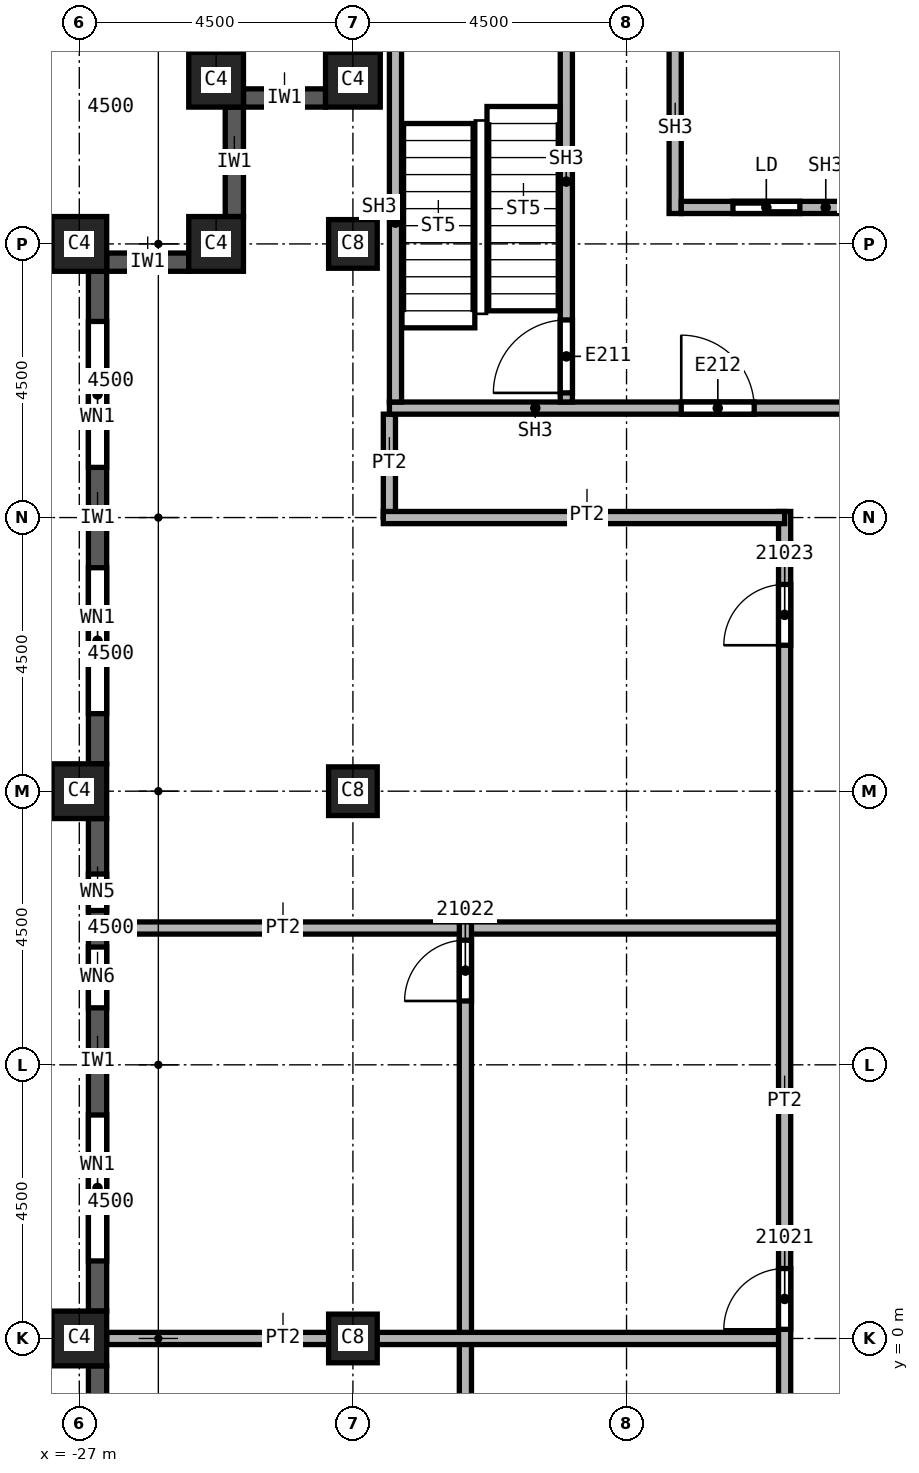
"""IFC4 building model, lengths in metres.
Left out: names, types, materials, properties, quantities, classifications, styles, units other than length and angle.
Written with IfcOpenShell. Run it as: python <this file> out.ifc"""

import sys

from ifc_helpers import new_model, si_unit, direction, frame, frame_2d, origin, origin_2d, place, context, subcontext, project, spatial, rectangle, extrude, element, fill, save


model = new_model("IFC4")
c1 = context("Model", 3, precision=1e-05, world=origin(), true_north=direction((0.0, 1.0)))
c2 = subcontext(c1, "Body", "Model", "MODEL_VIEW")
j1 = project(units=[si_unit("LENGTHUNIT", "METRE"), si_unit("PLANEANGLEUNIT", "RADIAN")], contexts=[c1])
p1 = place(None, origin())
s1 = spatial("IfcSite", under=j1, at=p1, CompositionType="ELEMENT")
p2 = place(p1, origin())
s2 = spatial("IfcBuilding", under=s1, at=p2, CompositionType="ELEMENT")
p3 = place(p2, frame((0.0, 0.0, 308.0)))
s3 = spatial("IfcBuildingStorey", under=s2, at=p3, CompositionType="ELEMENT", Elevation=308.0)
for number, where, z_axis, x_axis in (
    (1, (-22.5, 0.0, 0.0), (0.0, 0.0, 1.0), (1.0, 0.0, 0.0)),
    (2, (-22.5, 9.0, 0.0), (0.0, 0.0, 1.0), (1.0, 0.0, 0.0)),
    (3, (-22.5, 18.0, 0.0), (0.0, 0.0, 1.0), (1.0, 0.0, 0.0)),
):
    element("IfcColumn", number, at=place(p3, frame(where, z_axis=z_axis, x_axis=x_axis)), inside=s3, PredefinedType="COLUMN", context=c2, shape_type="SweptSolid", body=[
        extrude(rectangle(XDim=0.8, YDim=0.8, at=origin_2d()), origin(), (0.0, 0.0, 1.0), 3.74),
    ])
for number, where, z_axis, x_axis in (
    (4, (-27.0, 0.0, 0.0), (0.0, 0.0, 1.0), (0.0, 1.0, 0.0)),
    (5, (-27.0, 9.0, 0.0), (0.0, 0.0, 1.0), (0.0, 1.0, 0.0)),
    (6, (-27.0, 18.0, 0.0), (0.0, 0.0, 1.0), (0.0, 1.0, 0.0)),
    (7, (-22.5, 20.7, 0.0), (0.0, 0.0, 1.0), (1.0, 0.0, 0.0)),
    (8, (-24.75, 20.7, 0.0), (0.0, 0.0, 1.0), (1.0, 0.0, 0.0)),
    (9, (-24.75, 18.0, 0.0), (0.0, 0.0, 1.0), (1.0, 0.0, 0.0)),
):
    element("IfcColumn", number, at=place(p3, frame(where, z_axis=z_axis, x_axis=x_axis)), inside=s3, PredefinedType="COLUMN", context=c2, shape_type="SweptSolid", body=[
        extrude(rectangle(XDim=0.9, YDim=0.9, at=origin_2d()), origin(), (0.0, 0.0, 1.0), 3.74),
    ])
p4 = place(p3, frame((-24.45, 20.25, 0.0), z_axis=(0.0, 0.0, 1.0), x_axis=(0.0, -1.0, 0.0)))
e10 = element("IfcWall", 10, at=p4, inside=s3, PredefinedType="SOLIDWALL", context=c2, shape_type="SweptSolid", body=[
    extrude(rectangle(XDim=1.8, YDim=0.3, at=frame_2d((0.9, 0.0))), origin(), (0.0, 0.0, 1.0), 3.14),
])
p5 = place(p3, frame((-25.2, 17.7, 0.0), z_axis=(0.0, 0.0, 1.0), x_axis=(-1.0, 0.0, 0.0)))
e11 = element("IfcWall", 11, at=p5, inside=s3, PredefinedType="SOLIDWALL", context=c2, shape_type="SweptSolid", body=[
    extrude(rectangle(XDim=1.35, YDim=0.3, at=frame_2d((0.675, 0.0))), origin(), (0.0, 0.0, 1.0), 3.14),
])
p6 = place(p3, frame((-26.7, 17.55, 0.0), z_axis=(0.0, 0.0, 1.0), x_axis=(0.0, -1.0, 0.0)))
e12 = element("IfcWall", 12, at=p6, inside=s3, PredefinedType="SOLIDWALL", context=c2, shape_type="SweptSolid", body=[
    extrude(rectangle(XDim=8.1, YDim=0.3, at=frame_2d((4.05, 0.0))), origin(), (0.0, 0.0, 1.0), 3.14),
])
p7 = place(p6, frame((0.825, 0.0, 0.8)))
e13 = element("IfcOpeningElement", 13, at=p7, cuts=e12, PredefinedType="OPENING", context=c2, shape_type="SweptSolid", body=[
    extrude(rectangle(XDim=2.4, YDim=1.95, at=frame_2d((1.2, 0.975))), frame((0.0, 0.15, 0.0), z_axis=(0.0, -1.0, 0.0), x_axis=(1.0, 0.0, 0.0)), (0.0, 0.0, 1.0), 0.3),
])
p8 = place(p6, frame((4.875, 0.0, 0.8)))
e14 = element("IfcOpeningElement", 14, at=p8, cuts=e12, PredefinedType="OPENING", context=c2, shape_type="SweptSolid", body=[
    extrude(rectangle(XDim=2.4, YDim=1.95, at=frame_2d((1.2, 0.975))), frame((0.0, 0.15, 0.0), z_axis=(0.0, -1.0, 0.0), x_axis=(1.0, 0.0, 0.0)), (0.0, 0.0, 1.0), 0.3),
])
p9 = place(p3, frame((-26.7, 8.55, 0.0), z_axis=(0.0, 0.0, 1.0), x_axis=(0.0, -1.0, 0.0)))
e15 = element("IfcWall", 15, at=p9, inside=s3, PredefinedType="SOLIDWALL", context=c2, shape_type="SweptSolid", body=[
    extrude(rectangle(XDim=8.1, YDim=0.3, at=frame_2d((4.05, 0.0))), origin(), (0.0, 0.0, 1.0), 3.14),
])
p10 = place(p9, frame((4.875, 0.0, 0.8)))
e16 = element("IfcOpeningElement", 16, at=p10, cuts=e15, PredefinedType="OPENING", context=c2, shape_type="SweptSolid", body=[
    extrude(rectangle(XDim=2.4, YDim=1.95, at=frame_2d((1.2, 0.975))), frame((0.0, 0.15, 0.0), z_axis=(0.0, -1.0, 0.0), x_axis=(1.0, 0.0, 0.0)), (0.0, 0.0, 1.0), 0.3),
])
p11 = place(p9, frame((0.913, 0.0, 0.8)))
e17 = element("IfcOpeningElement", 17, at=p11, cuts=e15, PredefinedType="OPENING", context=c2, shape_type="SweptSolid", body=[
    extrude(rectangle(XDim=0.6, YDim=1.95, at=frame_2d((0.3, 0.975))), frame((0.0, 0.15, 0.0), z_axis=(0.0, -1.0, 0.0), x_axis=(1.0, 0.0, 0.0)), (0.0, 0.0, 1.0), 0.3),
])
p12 = place(p9, frame((2.113, 0.0, 0.8)))
e18 = element("IfcOpeningElement", 18, at=p12, cuts=e15, PredefinedType="OPENING", context=c2, shape_type="SweptSolid", body=[
    extrude(rectangle(XDim=1.0, YDim=1.95, at=frame_2d((0.5, 0.975))), frame((0.0, 0.15, 0.0), z_axis=(0.0, -1.0, 0.0), x_axis=(1.0, 0.0, 0.0)), (0.0, 0.0, 1.0), 0.3),
])
p13 = place(p3, frame((-26.7, -0.45, 0.0), z_axis=(0.0, 0.0, 1.0), x_axis=(0.0, -1.0, 0.0)))
e19 = element("IfcWall", 19, at=p13, inside=s3, PredefinedType="SOLIDWALL", context=c2, shape_type="SweptSolid", body=[
    extrude(rectangle(XDim=8.1, YDim=0.3, at=frame_2d((4.05, 0.0))), origin(), (0.0, 0.0, 1.0), 3.14),
])
p14 = place(p13, frame((0.825, 0.0, 0.8)))
e20 = element("IfcOpeningElement", 20, at=p14, cuts=e19, PredefinedType="OPENING", context=c2, shape_type="SweptSolid", body=[
    extrude(rectangle(XDim=2.4, YDim=1.95, at=frame_2d((1.2, 0.975))), frame((0.0, 0.15, 0.0), z_axis=(0.0, -1.0, 0.0), x_axis=(1.0, 0.0, 0.0)), (0.0, 0.0, 1.0), 0.3),
])
p15 = place(p13, frame((4.875, 0.0, 0.8)))
e21 = element("IfcOpeningElement", 21, at=p15, cuts=e19, PredefinedType="OPENING", context=c2, shape_type="SweptSolid", body=[
    extrude(rectangle(XDim=2.4, YDim=1.95, at=frame_2d((1.2, 0.975))), frame((0.0, 0.15, 0.0), z_axis=(0.0, -1.0, 0.0), x_axis=(1.0, 0.0, 0.0)), (0.0, 0.0, 1.0), 0.3),
])
p16 = place(p3, frame((-22.95, 20.4, 0.0), z_axis=(0.0, 0.0, 1.0), x_axis=(-1.0, 0.0, 0.0)))
e22 = element("IfcWall", 22, at=p16, inside=s3, PredefinedType="SOLIDWALL", context=c2, shape_type="SweptSolid", body=[
    extrude(rectangle(XDim=1.35, YDim=0.3, at=frame_2d((0.675, 0.0))), origin(), (0.0, 0.0, 1.0), 3.14),
])
p17 = place(p3, frame((-26.55, 6.75, 0.0), z_axis=(0.0, 0.0, 1.0), x_axis=(1.0, 0.0, 0.0)))
e23 = element("IfcWall", 23, at=p17, inside=s3, PredefinedType="PARTITIONING", context=c2, shape_type="SweptSolid", body=[
    extrude(rectangle(XDim=11.15, YDim=0.2, at=frame_2d((5.575, 0.0))), origin(), (0.0, 0.0, 1.0), 3.74),
])
p18 = place(p3, frame((-21.9, 13.5, 0.0), z_axis=(0.0, 0.0, 1.0), x_axis=(0.0, 1.0, 0.0)))
e24 = element("IfcWall", 24, at=p18, inside=s3, PredefinedType="PARTITIONING", context=c2, shape_type="SweptSolid", body=[
    extrude(rectangle(XDim=1.7, YDim=0.2, at=frame_2d((0.85, 0.0))), origin(), (0.0, 0.0, 1.0), 3.74),
])
p19 = place(p3, frame((-20.65, -11.25, 0.0), z_axis=(0.0, 0.0, 1.0), x_axis=(0.0, 1.0, 0.0)))
e25 = element("IfcWall", 25, at=p19, inside=s3, PredefinedType="PARTITIONING", context=c2, shape_type="SweptSolid", body=[
    extrude(rectangle(XDim=18.1, YDim=0.2, at=frame_2d((9.05, 0.0))), origin(), (0.0, 0.0, 1.0), 3.74),
])
p20 = place(p19, frame((16.8, 0.0, 0.0)))
e26 = element("IfcOpeningElement", 26, at=p20, cuts=e25, PredefinedType="OPENING", context=c2, shape_type="SweptSolid", body=[
    extrude(rectangle(XDim=1.0, YDim=2.1, at=frame_2d((0.5, 1.05))), frame((0.0, 0.1, 0.0), z_axis=(0.0, -1.0, 0.0), x_axis=(1.0, 0.0, 0.0)), (0.0, 0.0, 1.0), 0.2),
])
p21 = place(p19, frame((3.1, 0.0, 0.0)))
e27 = element("IfcOpeningElement", 27, at=p21, cuts=e25, PredefinedType="OPENING", context=c2, shape_type="SweptSolid", body=[
    extrude(rectangle(XDim=1.0, YDim=2.1, at=frame_2d((0.5, 1.05))), frame((0.0, 0.1, 0.0), z_axis=(0.0, -1.0, 0.0), x_axis=(1.0, 0.0, 0.0)), (0.0, 0.0, 1.0), 0.2),
])
p22 = place(p3, frame((-15.4, 0.0, 0.0), z_axis=(0.0, 0.0, 1.0), x_axis=(-1.0, 0.0, 0.0)))
e28 = element("IfcWall", 28, at=p22, inside=s3, PredefinedType="PARTITIONING", context=c2, shape_type="SweptSolid", body=[
    extrude(rectangle(XDim=11.15, YDim=0.2, at=frame_2d((5.575, 0.0))), origin(), (0.0, 0.0, 1.0), 3.74),
])
p23 = place(p3, frame((-15.4, -22.95, 0.0), z_axis=(0.0, 0.0, 1.0), x_axis=(0.0, 1.0, 0.0)))
e29 = element("IfcWall", 29, at=p23, inside=s3, PredefinedType="PARTITIONING", context=c2, shape_type="SweptSolid", body=[
    extrude(rectangle(XDim=36.55, YDim=0.2, at=frame_2d((18.275, 0.0))), origin(), (0.0, 0.0, 1.0), 3.74),
])
p24 = place(p23, frame((23.1, 0.0, 0.0)))
e30 = element("IfcOpeningElement", 30, at=p24, cuts=e29, PredefinedType="OPENING", context=c2, shape_type="SweptSolid", body=[
    extrude(rectangle(XDim=1.0, YDim=2.1, at=frame_2d((0.5, 1.05))), frame((0.0, 0.1, 0.0), z_axis=(0.0, -1.0, 0.0), x_axis=(1.0, 0.0, 0.0)), (0.0, 0.0, 1.0), 0.2),
])
p25 = place(p23, frame((34.35, 0.0, 0.0)))
e31 = element("IfcOpeningElement", 31, at=p25, cuts=e29, PredefinedType="OPENING", context=c2, shape_type="SweptSolid", body=[
    extrude(rectangle(XDim=1.0, YDim=2.1, at=frame_2d((0.5, 1.05))), frame((0.0, 0.1, 0.0), z_axis=(0.0, -1.0, 0.0), x_axis=(1.0, 0.0, 0.0)), (0.0, 0.0, 1.0), 0.2),
])
p26 = place(p23, frame((2.95, 0.0, 0.0)))
e32 = element("IfcOpeningElement", 32, at=p26, cuts=e29, PredefinedType="OPENING", context=c2, shape_type="SweptSolid", body=[
    extrude(rectangle(XDim=1.0, YDim=2.1, at=frame_2d((0.5, 1.05))), frame((0.0, 0.1, 0.0), z_axis=(0.0, -1.0, 0.0), x_axis=(1.0, 0.0, 0.0)), (0.0, 0.0, 1.0), 0.2),
])
p27 = place(p23, frame((6.15, 0.0, 0.0)))
e33 = element("IfcOpeningElement", 33, at=p27, cuts=e29, PredefinedType="OPENING", context=c2, shape_type="SweptSolid", body=[
    extrude(rectangle(XDim=1.0, YDim=2.1, at=frame_2d((0.5, 1.05))), frame((0.0, 0.1, 0.0), z_axis=(0.0, -1.0, 0.0), x_axis=(1.0, 0.0, 0.0)), (0.0, 0.0, 1.0), 0.2),
])
p28 = place(p23, frame((8.625, 0.0, 0.0)))
e34 = element("IfcOpeningElement", 34, at=p28, cuts=e29, PredefinedType="OPENING", context=c2, shape_type="SweptSolid", body=[
    extrude(rectangle(XDim=1.0, YDim=2.1, at=frame_2d((0.5, 1.05))), frame((0.0, 0.1, 0.0), z_axis=(0.0, -1.0, 0.0), x_axis=(1.0, 0.0, 0.0)), (0.0, 0.0, 1.0), 0.2),
])
p29 = place(p23, frame((15.0, 0.0, 0.0)))
e35 = element("IfcOpeningElement", 35, at=p29, cuts=e29, PredefinedType="OPENING", context=c2, shape_type="SweptSolid", body=[
    extrude(rectangle(XDim=1.0, YDim=2.1, at=frame_2d((0.5, 1.05))), frame((0.0, 0.1, 0.0), z_axis=(0.0, -1.0, 0.0), x_axis=(1.0, 0.0, 0.0)), (0.0, 0.0, 1.0), 0.2),
])
p30 = place(p3, frame((-15.4, 13.5, 0.0), z_axis=(0.0, 0.0, 1.0), x_axis=(-1.0, 0.0, 0.0)))
e36 = element("IfcWall", 36, at=p30, inside=s3, PredefinedType="PARTITIONING", context=c2, shape_type="SweptSolid", body=[
    extrude(rectangle(XDim=6.6, YDim=0.2, at=frame_2d((3.3, 0.0))), origin(), (0.0, 0.0, 1.0), 3.74),
])
p31 = place(p3, frame((-21.9, 15.3, 0.0), z_axis=(0.0, 0.0, 1.0), x_axis=(1.0, 0.0, 0.0)))
e37 = element("IfcWall", 37, at=p31, inside=s3, PredefinedType="SOLIDWALL", context=c2, shape_type="SweptSolid", body=[
    extrude(rectangle(XDim=8.275, YDim=0.2, at=frame_2d((4.137, 0.0))), origin(), (0.0, 0.0, 1.0), 3.74),
])
p32 = place(p31, frame((4.8, 0.0, 0.0)))
e38 = element("IfcOpeningElement", 38, at=p32, cuts=e37, PredefinedType="OPENING", context=c2, shape_type="SweptSolid", body=[
    extrude(rectangle(XDim=1.2, YDim=2.1, at=frame_2d((0.6, 1.05))), frame((0.0, 0.1, 0.0), z_axis=(0.0, -1.0, 0.0), x_axis=(1.0, 0.0, 0.0)), (0.0, 0.0, 1.0), 0.2),
])
p33 = place(p3, frame((-21.8, 15.4, 0.0), z_axis=(0.0, 0.0, 1.0), x_axis=(0.0, 1.0, 0.0)))
e39 = element("IfcWall", 39, at=p33, inside=s3, PredefinedType="SOLIDWALL", context=c2, shape_type="SweptSolid", body=[
    extrude(rectangle(XDim=5.9, YDim=0.2, at=frame_2d((2.95, 0.0))), origin(), (0.0, 0.0, 1.0), 3.74),
])
p34 = place(p3, frame((-18.99, 15.4, 0.0), z_axis=(0.0, 0.0, 1.0), x_axis=(0.0, 1.0, 0.0)))
e40 = element("IfcWall", 40, at=p34, inside=s3, PredefinedType="SOLIDWALL", context=c2, shape_type="SweptSolid", body=[
    extrude(rectangle(XDim=5.9, YDim=0.2, at=frame_2d((2.95, 0.0))), origin(), (0.0, 0.0, 1.0), 3.74),
])
p35 = place(p34, frame((0.15, 0.0, 0.0)))
e41 = element("IfcOpeningElement", 41, at=p35, cuts=e40, PredefinedType="OPENING", context=c2, shape_type="SweptSolid", body=[
    extrude(rectangle(XDim=1.2, YDim=2.1, at=frame_2d((0.6, 1.05))), frame((0.0, 0.1, 0.0), z_axis=(0.0, -1.0, 0.0), x_axis=(1.0, 0.0, 0.0)), (0.0, 0.0, 1.0), 0.2),
])
p36 = place(p3, frame((-17.2, 18.5, 0.0), z_axis=(0.0, 0.0, 1.0), x_axis=(0.0, 1.0, 0.0)))
e42 = element("IfcWall", 42, at=p36, inside=s3, PredefinedType="SOLIDWALL", context=c2, shape_type="SweptSolid", body=[
    extrude(rectangle(XDim=2.8, YDim=0.2, at=frame_2d((1.4, 0.0))), origin(), (0.0, 0.0, 1.0), 3.74),
])
p37 = place(p3, frame((-17.1, 18.6, 0.0), z_axis=(0.0, 0.0, 1.0), x_axis=(1.0, 0.0, 0.0)))
e43 = element("IfcWall", 43, at=p37, inside=s3, PredefinedType="SOLIDWALL", context=c2, shape_type="SweptSolid", body=[
    extrude(rectangle(XDim=2.8, YDim=0.2, at=frame_2d((1.4, 0.0))), origin(), (0.0, 0.0, 1.0), 3.74),
])
p38 = place(p37, frame((0.85, 0.0, 0.0)))
e44 = element("IfcOpeningElement", 44, at=p38, cuts=e43, PredefinedType="OPENING", context=c2, shape_type="SweptSolid", body=[
    extrude(rectangle(XDim=1.1, YDim=2.1, at=frame_2d((0.55, 1.05))), frame((0.0, 0.1, 0.0), z_axis=(0.0, -1.0, 0.0), x_axis=(1.0, 0.0, 0.0)), (0.0, 0.0, 1.0), 0.2),
])
p39 = place(p7, origin())
e45 = element("IfcWindow", 45, at=p39, inside=s3, PartitioningType="SINGLE_PANEL", PredefinedType="WINDOW", context=c2, shape_type="SweptSolid", body=[
    extrude(rectangle(XDim=2.4, YDim=1.95, at=frame_2d((1.2, 0.975))), frame((0.0, 0.03, 0.0), z_axis=(0.0, -1.0, 0.0), x_axis=(1.0, 0.0, 0.0)), (0.0, 0.0, 1.0), 0.06),
])
fill(e13, e45)
p40 = place(p8, origin())
e46 = element("IfcWindow", 46, at=p40, inside=s3, PartitioningType="SINGLE_PANEL", PredefinedType="WINDOW", context=c2, shape_type="SweptSolid", body=[
    extrude(rectangle(XDim=2.4, YDim=1.95, at=frame_2d((1.2, 0.975))), frame((0.0, 0.03, 0.0), z_axis=(0.0, -1.0, 0.0), x_axis=(1.0, 0.0, 0.0)), (0.0, 0.0, 1.0), 0.06),
])
fill(e14, e46)
p41 = place(p10, origin())
e47 = element("IfcWindow", 47, at=p41, inside=s3, PartitioningType="SINGLE_PANEL", PredefinedType="WINDOW", context=c2, shape_type="SweptSolid", body=[
    extrude(rectangle(XDim=2.4, YDim=1.95, at=frame_2d((1.2, 0.975))), frame((0.0, 0.03, 0.0), z_axis=(0.0, -1.0, 0.0), x_axis=(1.0, 0.0, 0.0)), (0.0, 0.0, 1.0), 0.06),
])
fill(e16, e47)
p42 = place(p24, origin())
e48 = element("IfcDoor", 48, at=p42, inside=s3, OperationType="SINGLE_SWING_RIGHT", PredefinedType="DOOR", context=c2, shape_type="SweptSolid", body=[
    extrude(rectangle(XDim=1.0, YDim=2.1, at=frame_2d((0.5, 1.05))), frame((0.0, 0.025, 0.0), z_axis=(0.0, -1.0, 0.0), x_axis=(1.0, 0.0, 0.0)), (0.0, 0.0, 1.0), 0.05),
])
fill(e30, e48)
p43 = place(p20, origin())
e49 = element("IfcDoor", 49, at=p43, inside=s3, OperationType="SINGLE_SWING_LEFT", PredefinedType="DOOR", context=c2, shape_type="SweptSolid", body=[
    extrude(rectangle(XDim=1.0, YDim=2.1, at=frame_2d((0.5, 1.05))), frame((0.0, 0.025, 0.0), z_axis=(0.0, -1.0, 0.0), x_axis=(1.0, 0.0, 0.0)), (0.0, 0.0, 1.0), 0.05),
])
fill(e26, e49)
p44 = place(p25, origin())
e50 = element("IfcDoor", 50, at=p44, inside=s3, OperationType="SINGLE_SWING_RIGHT", PredefinedType="DOOR", context=c2, shape_type="SweptSolid", body=[
    extrude(rectangle(XDim=1.0, YDim=2.1, at=frame_2d((0.5, 1.05))), frame((0.0, 0.025, 0.0), z_axis=(0.0, -1.0, 0.0), x_axis=(1.0, 0.0, 0.0)), (0.0, 0.0, 1.0), 0.05),
])
fill(e31, e50)
p45 = place(p35, origin())
e51 = element("IfcDoor", 51, at=p45, inside=s3, OperationType="SINGLE_SWING_LEFT", PredefinedType="DOOR", context=c2, shape_type="SweptSolid", body=[
    extrude(rectangle(XDim=1.2, YDim=2.1, at=frame_2d((0.6, 1.05))), frame((0.0, 0.025, 0.0), z_axis=(0.0, -1.0, 0.0), x_axis=(1.0, 0.0, 0.0)), (0.0, 0.0, 1.0), 0.05),
])
fill(e41, e51)
p46 = place(p38, origin())
e52 = element("IfcDoor", 52, at=p46, inside=s3, OperationType="SLIDING_TO_LEFT", PredefinedType="DOOR", context=c2, shape_type="SweptSolid", body=[
    extrude(rectangle(XDim=1.1, YDim=2.1, at=frame_2d((0.55, 1.05))), frame((0.0, 0.025, 0.0), z_axis=(0.0, -1.0, 0.0), x_axis=(1.0, 0.0, 0.0)), (0.0, 0.0, 1.0), 0.05),
])
fill(e44, e52)
p47 = place(p32, origin())
e53 = element("IfcDoor", 53, at=p47, inside=s3, OperationType="SINGLE_SWING_RIGHT", PredefinedType="DOOR", context=c2, shape_type="SweptSolid", body=[
    extrude(rectangle(XDim=1.2, YDim=2.1, at=frame_2d((0.6, 1.05))), frame((0.0, 0.025, 0.0), z_axis=(0.0, -1.0, 0.0), x_axis=(1.0, 0.0, 0.0)), (0.0, 0.0, 1.0), 0.05),
])
fill(e38, e53)
p48 = place(p11, origin())
e54 = element("IfcWindow", 54, at=p48, inside=s3, PartitioningType="SINGLE_PANEL", PredefinedType="WINDOW", context=c2, shape_type="SweptSolid", body=[
    extrude(rectangle(XDim=0.6, YDim=1.95, at=frame_2d((0.3, 0.975))), frame((0.0, 0.03, 0.0), z_axis=(0.0, -1.0, 0.0), x_axis=(1.0, 0.0, 0.0)), (0.0, 0.0, 1.0), 0.06),
])
fill(e17, e54)
p49 = place(p12, origin())
e55 = element("IfcWindow", 55, at=p49, inside=s3, PartitioningType="SINGLE_PANEL", PredefinedType="WINDOW", context=c2, shape_type="SweptSolid", body=[
    extrude(rectangle(XDim=1.0, YDim=1.95, at=frame_2d((0.5, 0.975))), frame((0.0, 0.03, 0.0), z_axis=(0.0, -1.0, 0.0), x_axis=(1.0, 0.0, 0.0)), (0.0, 0.0, 1.0), 0.06),
])
fill(e18, e55)
save(model, sys.argv[1])
